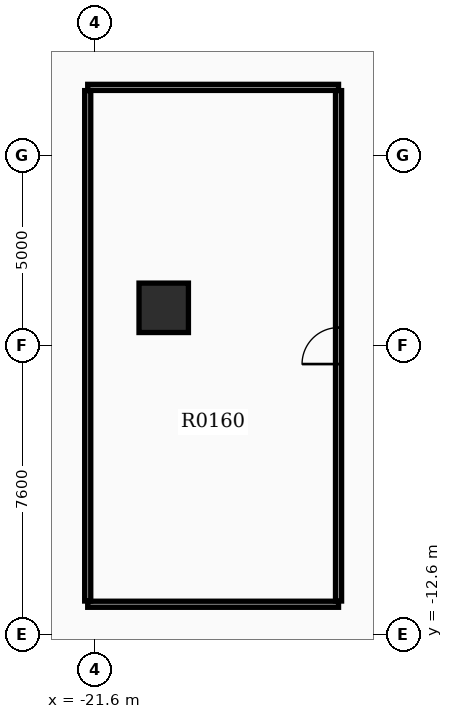
"""IFC4 building model, lengths in metres.
Left out: names, types, materials, properties, quantities, classifications, styles, units other than length and angle.
Written with IfcOpenShell. Run it as: python <this file> out.ifc"""

import sys

from ifc_helpers import new_model, si_unit, direction, frame, frame_2d, origin, origin_2d, place, context, subcontext, project, spatial, rectangle, extrude, element, fill, save


model = new_model("IFC4")
c1 = context("Model", 3, precision=1e-05, world=origin(), true_north=direction((0.0, 1.0)))
c2 = subcontext(c1, "Body", "Model", "MODEL_VIEW")
j1 = project(units=[si_unit("LENGTHUNIT", "METRE"), si_unit("PLANEANGLEUNIT", "RADIAN")], contexts=[c1])
p1 = place(None, origin())
s1 = spatial("IfcSite", under=j1, at=p1, CompositionType="ELEMENT")
p2 = place(p1, origin())
s2 = spatial("IfcBuilding", under=s1, at=p2, CompositionType="ELEMENT")
p3 = place(p2, frame((0.0, 0.0, 5.4)))
s3 = spatial("IfcBuildingStorey", under=s2, at=p3, CompositionType="ELEMENT", Elevation=5.4)
p4 = place(p3, frame((-19.8, -4.0, 0.0), z_axis=(0.0, 0.0, 1.0), x_axis=(1.0, 0.0, 0.0)))
e1 = element("IfcColumn", 1, at=p4, inside=s3, PredefinedType="COLUMN", context=c2, shape_type="SweptSolid", body=[
    extrude(rectangle(XDim=1.3, YDim=1.3, at=origin_2d()), origin(), (0.0, 0.0, 1.0), 4.8),
])
for number, where, z_axis, x_axis in (
    (2, (-21.8, -11.8, 0.0), (0.0, 0.0, 1.0), (1.0, 0.0, 0.0)),
    (3, (-21.8, 1.8, 0.0), (0.0, 0.0, 1.0), (1.0, 0.0, 0.0)),
):
    element("IfcWall", number, at=place(p3, frame(where, z_axis=z_axis, x_axis=x_axis)), inside=s3, PredefinedType="PARTITIONING", context=c2, shape_type="SweptSolid", body=[
        extrude(rectangle(XDim=6.6, YDim=0.16, at=frame_2d((3.3, 0.0))), origin(), (0.0, 0.0, 1.0), 3.62),
    ])
p5 = place(p3, frame((-21.8, -11.715, 0.0), z_axis=(0.0, 0.0, 1.0), x_axis=(0.0, 1.0, 0.0)))
e4 = element("IfcWall", 4, at=p5, inside=s3, PredefinedType="PARTITIONING", context=c2, shape_type="SweptSolid", body=[
    extrude(rectangle(XDim=13.43, YDim=0.16, at=frame_2d((6.715, 0.0))), origin(), (0.0, 0.0, 1.0), 3.62),
])
p6 = place(p3, frame((-15.2, -11.715, 0.0), z_axis=(0.0, 0.0, 1.0), x_axis=(0.0, 1.0, 0.0)))
e5 = element("IfcWall", 5, at=p6, inside=s3, PredefinedType="PARTITIONING", context=c2, shape_type="SweptSolid", body=[
    extrude(rectangle(XDim=13.43, YDim=0.16, at=frame_2d((6.715, 0.0))), origin(), (0.0, 0.0, 1.0), 3.62),
])
p7 = place(p6, frame((6.235, 0.0, 0.0)))
e6 = element("IfcOpeningElement", 6, at=p7, cuts=e5, PredefinedType="OPENING", context=c2, shape_type="SweptSolid", body=[
    extrude(rectangle(XDim=0.96, YDim=2.15, at=frame_2d((0.48, 1.075))), frame((0.0, 0.09, 0.0), z_axis=(0.0, -1.0, 0.0), x_axis=(1.0, 0.0, 0.0)), (0.0, 0.0, 1.0), 0.18),
])
p8 = place(p7, origin())
e7 = element("IfcDoor", 7, at=p8, inside=s3, OperationType="SINGLE_SWING_LEFT", PredefinedType="DOOR", context=c2, shape_type="SweptSolid", body=[
    extrude(rectangle(XDim=0.96, YDim=2.15, at=frame_2d((0.48, 1.075))), frame((0.0, 0.025, 0.0), z_axis=(0.0, -1.0, 0.0), x_axis=(1.0, 0.0, 0.0)), (0.0, 0.0, 1.0), 0.05),
])
fill(e6, e7)
save(model, sys.argv[1])
